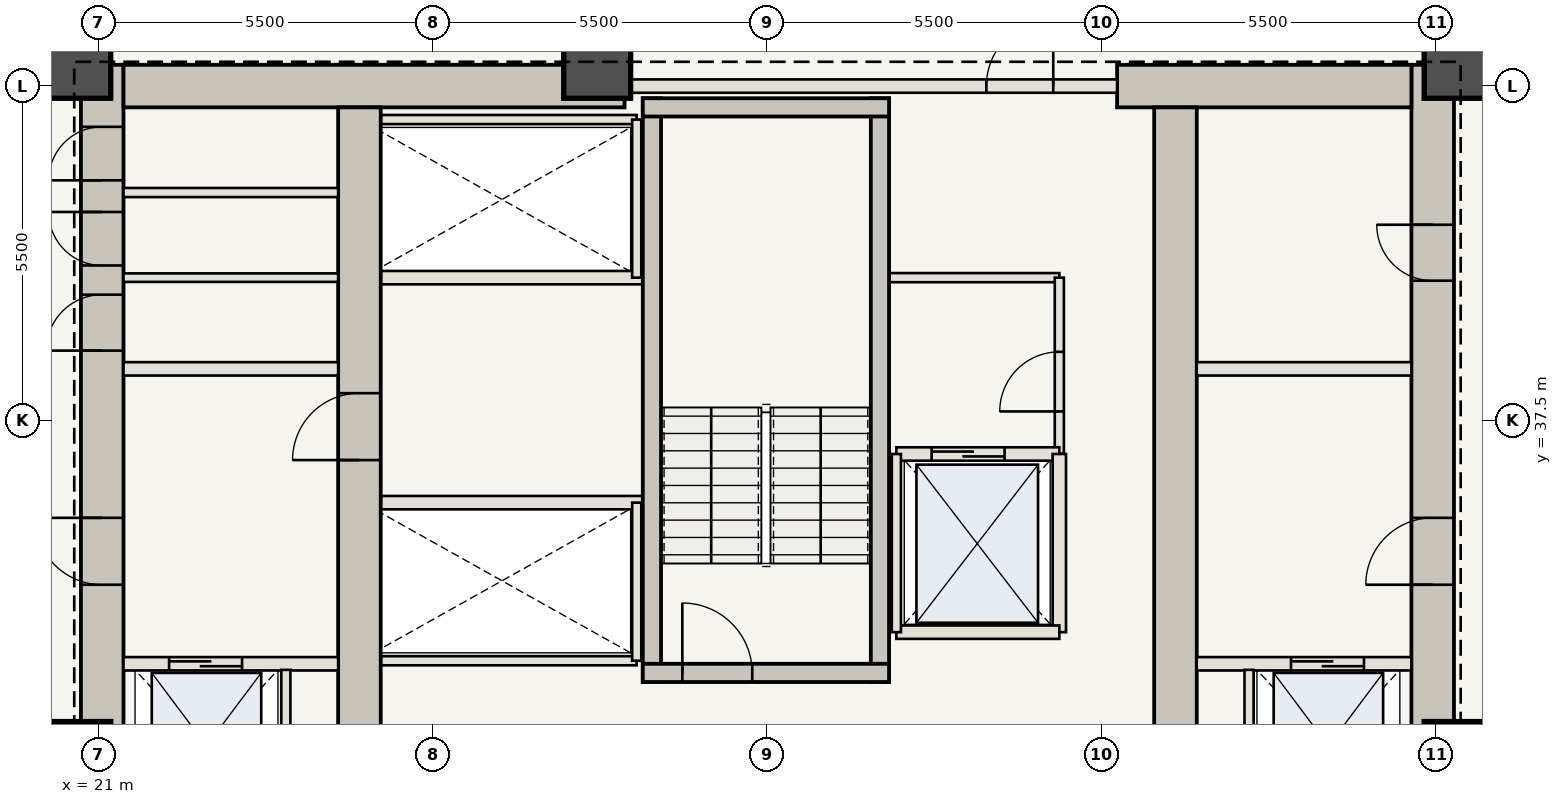
"""IFC4 building model, lengths in metres.
Left out: names, types, materials, properties, quantities, classifications, styles, units other than length and angle.
Written with IfcOpenShell. Run it as: python <this file> out.ifc"""

import sys

from ifc_helpers import new_model, si_unit, direction, frame, frame_2d, origin, origin_2d, place, context, subcontext, project, spatial, rectangle, extrude, element, fill, save


model = new_model("IFC4")
c1 = context("Model", 3, precision=1e-05, world=origin(), true_north=direction((0.0, 1.0)))
c2 = subcontext(c1, "Body", "Model", "MODEL_VIEW")
j1 = project(units=[si_unit("LENGTHUNIT", "METRE"), si_unit("PLANEANGLEUNIT", "RADIAN")], contexts=[c1])
p1 = place(None, origin())
s1 = spatial("IfcSite", under=j1, at=p1, CompositionType="ELEMENT")
p2 = place(p1, origin())
s2 = spatial("IfcBuilding", under=s1, at=p2, CompositionType="ELEMENT")
p3 = place(p2, frame((0.0, 0.0, 89.25)))
s3 = spatial("IfcBuildingStorey", under=s2, at=p3, CompositionType="ELEMENT", Elevation=89.25)
p4 = place(p3, frame((21.06, 30.6, 0.0), z_axis=(0.0, 0.0, 1.0), x_axis=(0.0, 1.0, 0.0)))
e1 = element("IfcWall", 1, at=p4, inside=s3, PredefinedType="SHEAR", context=c2, shape_type="SweptSolid", body=[
    extrude(rectangle(XDim=12.75, YDim=0.7, at=frame_2d((6.375, 0.0))), origin(), (0.0, 0.0, 1.0), 3.5),
])
p5 = place(p4, frame((4.2, 0.0, 0.0)))
e2 = element("IfcOpeningElement", 2, at=p5, cuts=e1, PredefinedType="OPENING", context=c2, shape_type="SweptSolid", body=[
    extrude(rectangle(XDim=1.1, YDim=2.15, at=frame_2d((0.55, 1.075))), frame((0.0, 0.36, 0.0), z_axis=(0.0, -1.0, 0.0), x_axis=(1.0, 0.0, 0.0)), (0.0, 0.0, 1.0), 0.72),
])
p6 = place(p4, frame((8.05, 0.0, 0.0)))
e3 = element("IfcOpeningElement", 3, at=p6, cuts=e1, PredefinedType="OPENING", context=c2, shape_type="SweptSolid", body=[
    extrude(rectangle(XDim=0.92, YDim=2.1, at=frame_2d((0.46, 1.05))), frame((0.0, 0.36, 0.0), z_axis=(0.0, -1.0, 0.0), x_axis=(1.0, 0.0, 0.0)), (0.0, 0.0, 1.0), 0.72),
])
p7 = place(p4, frame((9.45, 0.0, 0.0)))
e4 = element("IfcOpeningElement", 4, at=p7, cuts=e1, PredefinedType="OPENING", context=c2, shape_type="SweptSolid", body=[
    extrude(rectangle(XDim=0.88, YDim=2.1, at=frame_2d((0.44, 1.05))), frame((0.0, 0.36, 0.0), z_axis=(0.0, -1.0, 0.0), x_axis=(1.0, 0.0, 0.0)), (0.0, 0.0, 1.0), 0.72),
])
p8 = place(p4, frame((10.85, 0.0, 0.0)))
e5 = element("IfcOpeningElement", 5, at=p8, cuts=e1, PredefinedType="OPENING", context=c2, shape_type="SweptSolid", body=[
    extrude(rectangle(XDim=0.88, YDim=2.1, at=frame_2d((0.44, 1.05))), frame((0.0, 0.36, 0.0), z_axis=(0.0, -1.0, 0.0), x_axis=(1.0, 0.0, 0.0)), (0.0, 0.0, 1.0), 0.72),
])
p9 = place(p3, frame((42.94, 30.6, 0.0), z_axis=(0.0, 0.0, 1.0), x_axis=(0.0, 1.0, 0.0)))
e6 = element("IfcWall", 6, at=p9, inside=s3, PredefinedType="SHEAR", context=c2, shape_type="SweptSolid", body=[
    extrude(rectangle(XDim=12.75, YDim=0.7, at=frame_2d((6.375, 0.0))), origin(), (0.0, 0.0, 1.0), 3.5),
])
p10 = place(p9, frame((4.2, 0.0, 0.0)))
e7 = element("IfcOpeningElement", 7, at=p10, cuts=e6, PredefinedType="OPENING", context=c2, shape_type="SweptSolid", body=[
    extrude(rectangle(XDim=1.1, YDim=2.15, at=frame_2d((0.55, 1.075))), frame((0.0, 0.36, 0.0), z_axis=(0.0, -1.0, 0.0), x_axis=(1.0, 0.0, 0.0)), (0.0, 0.0, 1.0), 0.72),
])
p11 = place(p9, frame((9.2, 0.0, 0.0)))
e8 = element("IfcOpeningElement", 8, at=p11, cuts=e6, PredefinedType="OPENING", context=c2, shape_type="SweptSolid", body=[
    extrude(rectangle(XDim=0.92, YDim=2.1, at=frame_2d((0.46, 1.05))), frame((0.0, 0.36, 0.0), z_axis=(0.0, -1.0, 0.0), x_axis=(1.0, 0.0, 0.0)), (0.0, 0.0, 1.0), 0.72),
])
p12 = place(p3, frame((21.41, 43.0, 0.0), z_axis=(0.0, 0.0, 1.0), x_axis=(1.0, 0.0, 0.0)))
e9 = element("IfcWall", 9, at=p12, inside=s3, PredefinedType="SHEAR", context=c2, shape_type="SweptSolid", body=[
    extrude(rectangle(XDim=8.24, YDim=0.7, at=frame_2d((4.12, 0.0))), origin(), (0.0, 0.0, 1.0), 3.5),
])
p13 = place(p3, frame((37.75, 43.0, 0.0), z_axis=(0.0, 0.0, 1.0), x_axis=(1.0, 0.0, 0.0)))
e10 = element("IfcWall", 10, at=p13, inside=s3, PredefinedType="SHEAR", context=c2, shape_type="SweptSolid", body=[
    extrude(rectangle(XDim=4.84, YDim=0.7, at=frame_2d((2.42, 0.0))), origin(), (0.0, 0.0, 1.0), 3.5),
])
p14 = place(p3, frame((25.29, 30.6, 0.0), z_axis=(0.0, 0.0, 1.0), x_axis=(0.0, 1.0, 0.0)))
e11 = element("IfcWall", 11, at=p14, inside=s3, PredefinedType="SHEAR", context=c2, shape_type="SweptSolid", body=[
    extrude(rectangle(XDim=12.05, YDim=0.7, at=frame_2d((6.025, 0.0))), origin(), (0.0, 0.0, 1.0), 3.5),
])
p15 = place(p14, frame((6.25, 0.0, 0.0)))
e12 = element("IfcOpeningElement", 12, at=p15, cuts=e11, PredefinedType="OPENING", context=c2, shape_type="SweptSolid", body=[
    extrude(rectangle(XDim=1.1, YDim=2.15, at=frame_2d((0.55, 1.075))), frame((0.0, 0.36, 0.0), z_axis=(0.0, -1.0, 0.0), x_axis=(1.0, 0.0, 0.0)), (0.0, 0.0, 1.0), 0.72),
])
p16 = place(p3, frame((38.71, 30.6, 0.0), z_axis=(0.0, 0.0, 1.0), x_axis=(0.0, 1.0, 0.0)))
e13 = element("IfcWall", 13, at=p16, inside=s3, PredefinedType="SHEAR", context=c2, shape_type="SweptSolid", body=[
    extrude(rectangle(XDim=12.05, YDim=0.7, at=frame_2d((6.025, 0.0))), origin(), (0.0, 0.0, 1.0), 3.5),
])
for number, where, z_axis, x_axis in (
    (14, (43.35, 32.0, 0.0), (0.0, 0.0, 1.0), (1.0, 0.0, 0.0)),
    (15, (43.35, 43.35, 0.0), (0.0, 0.0, 1.0), (1.0, 0.0, 0.0)),
    (16, (29.2, 43.35, 0.0), (0.0, 0.0, 1.0), (1.0, 0.0, 0.0)),
    (17, (20.65, 43.35, 0.0), (0.0, 0.0, 1.0), (1.0, 0.0, 0.0)),
    (18, (20.65, 32.0, 0.0), (0.0, 0.0, 1.0), (1.0, 0.0, 0.0)),
):
    element("IfcColumn", number, at=place(p3, frame(where, z_axis=z_axis, x_axis=x_axis)), inside=s3, PredefinedType="COLUMN", context=c2, shape_type="SweptSolid", body=[
        extrude(rectangle(XDim=1.1, YDim=1.1, at=origin_2d()), origin(), (0.0, 0.0, 1.0), 3.5),
    ])
p17 = place(p3, frame((21.41, 33.5, 0.0), z_axis=(0.0, 0.0, 1.0), x_axis=(1.0, 0.0, 0.0)))
e19 = element("IfcWall", 19, at=p17, inside=s3, PredefinedType="STANDARD", context=c2, shape_type="SweptSolid", body=[
    extrude(rectangle(XDim=3.53, YDim=0.22, at=frame_2d((1.765, 0.0))), origin(), (0.0, 0.0, 1.0), 3.32),
])
p18 = place(p17, frame((0.75, 0.0, 0.0)))
e20 = element("IfcOpeningElement", 20, at=p18, cuts=e19, PredefinedType="OPENING", context=c2, shape_type="SweptSolid", body=[
    extrude(rectangle(XDim=1.2, YDim=2.2, at=frame_2d((0.6, 1.1))), frame((0.0, 0.12, 0.0), z_axis=(0.0, -1.0, 0.0), x_axis=(1.0, 0.0, 0.0)), (0.0, 0.0, 1.0), 0.24),
])
p19 = place(p3, frame((24.08, 30.75, 0.0), z_axis=(0.0, 0.0, 1.0), x_axis=(0.0, 1.0, 0.0)))
e21 = element("IfcWall", 21, at=p19, inside=s3, PredefinedType="STANDARD", context=c2, shape_type="SweptSolid", body=[
    extrude(rectangle(XDim=2.65, YDim=0.15, at=frame_2d((1.325, 0.0))), origin(), (0.0, 0.0, 1.0), 3.32),
])
p20 = place(p3, frame((39.06, 33.5, 0.0), z_axis=(0.0, 0.0, 1.0), x_axis=(1.0, 0.0, 0.0)))
e22 = element("IfcWall", 22, at=p20, inside=s3, PredefinedType="STANDARD", context=c2, shape_type="SweptSolid", body=[
    extrude(rectangle(XDim=3.53, YDim=0.22, at=frame_2d((1.765, 0.0))), origin(), (0.0, 0.0, 1.0), 3.32),
])
p21 = place(p20, frame((1.55, 0.0, 0.0)))
e23 = element("IfcOpeningElement", 23, at=p21, cuts=e22, PredefinedType="OPENING", context=c2, shape_type="SweptSolid", body=[
    extrude(rectangle(XDim=1.2, YDim=2.2, at=frame_2d((0.6, 1.1))), frame((0.0, 0.12, 0.0), z_axis=(0.0, -1.0, 0.0), x_axis=(1.0, 0.0, 0.0)), (0.0, 0.0, 1.0), 0.24),
])
p22 = place(p3, frame((39.92, 30.75, 0.0), z_axis=(0.0, 0.0, 1.0), x_axis=(0.0, 1.0, 0.0)))
e24 = element("IfcWall", 24, at=p22, inside=s3, PredefinedType="STANDARD", context=c2, shape_type="SweptSolid", body=[
    extrude(rectangle(XDim=2.65, YDim=0.15, at=frame_2d((1.325, 0.0))), origin(), (0.0, 0.0, 1.0), 3.32),
])
for number, where, z_axis, x_axis in (
    (25, (21.41, 38.35, 0.0), (0.0, 0.0, 1.0), (1.0, 0.0, 0.0)),
    (26, (39.06, 38.35, 0.0), (0.0, 0.0, 1.0), (1.0, 0.0, 0.0)),
):
    element("IfcWall", number, at=place(p3, frame(where, z_axis=z_axis, x_axis=x_axis)), inside=s3, PredefinedType="STANDARD", context=c2, shape_type="SweptSolid", body=[
        extrude(rectangle(XDim=3.53, YDim=0.22, at=frame_2d((1.765, 0.0))), origin(), (0.0, 0.0, 1.0), 3.32),
    ])
p23 = place(p3, frame((21.41, 39.85, 0.0), z_axis=(0.0, 0.0, 1.0), x_axis=(1.0, 0.0, 0.0)))
e27 = element("IfcWall", 27, at=p23, inside=s3, PredefinedType="STANDARD", context=c2, shape_type="SweptSolid", body=[
    extrude(rectangle(XDim=3.53, YDim=0.14, at=frame_2d((1.765, 0.0))), origin(), (0.0, 0.0, 1.0), 3.32),
])
p24 = place(p3, frame((21.41, 41.25, 0.0), z_axis=(0.0, 0.0, 1.0), x_axis=(1.0, 0.0, 0.0)))
e28 = element("IfcWall", 28, at=p24, inside=s3, PredefinedType="STANDARD", context=c2, shape_type="SweptSolid", body=[
    extrude(rectangle(XDim=3.53, YDim=0.15, at=frame_2d((1.765, 0.0))), origin(), (0.0, 0.0, 1.0), 3.32),
])
p25 = place(p3, frame((34.0, 39.85, 0.0), z_axis=(0.0, 0.0, 1.0), x_axis=(1.0, 0.0, 0.0)))
e29 = element("IfcWall", 29, at=p25, inside=s3, PredefinedType="STANDARD", context=c2, shape_type="SweptSolid", body=[
    extrude(rectangle(XDim=2.8, YDim=0.15, at=frame_2d((1.4, 0.0))), origin(), (0.0, 0.0, 1.0), 3.32),
])
p26 = place(p3, frame((36.8, 36.95, 0.0), z_axis=(0.0, 0.0, 1.0), x_axis=(0.0, 1.0, 0.0)))
e30 = element("IfcWall", 30, at=p26, inside=s3, PredefinedType="STANDARD", context=c2, shape_type="SweptSolid", body=[
    extrude(rectangle(XDim=2.9, YDim=0.15, at=frame_2d((1.45, 0.0))), origin(), (0.0, 0.0, 1.0), 3.32),
])
p27 = place(p26, frame((0.7, 0.0, 0.0)))
e31 = element("IfcOpeningElement", 31, at=p27, cuts=e30, PredefinedType="OPENING", context=c2, shape_type="SweptSolid", body=[
    extrude(rectangle(XDim=0.98, YDim=2.2, at=frame_2d((0.49, 1.1))), frame((0.0, 0.085, 0.0), z_axis=(0.0, -1.0, 0.0), x_axis=(1.0, 0.0, 0.0)), (0.0, 0.0, 1.0), 0.17),
])
p28 = place(p3, frame((25.65, 36.15, 0.0), z_axis=(0.0, 0.0, 1.0), x_axis=(1.0, 0.0, 0.0)))
e32 = element("IfcWall", 32, at=p28, inside=s3, PredefinedType="STANDARD", context=c2, shape_type="SweptSolid", body=[
    extrude(rectangle(XDim=4.3, YDim=0.22, at=frame_2d((2.15, 0.0))), origin(), (0.0, 0.0, 1.0), 3.32),
])
p29 = place(p3, frame((25.65, 33.55, 0.0), z_axis=(0.0, 0.0, 1.0), x_axis=(1.0, 0.0, 0.0)))
e33 = element("IfcWall", 33, at=p29, inside=s3, PredefinedType="STANDARD", context=c2, shape_type="SweptSolid", body=[
    extrude(rectangle(XDim=4.2, YDim=0.15, at=frame_2d((2.1, 0.0))), origin(), (0.0, 0.0, 1.0), 3.32),
])
p30 = place(p3, frame((29.85, 33.55, 0.0), z_axis=(0.0, 0.0, 1.0), x_axis=(0.0, 1.0, 0.0)))
e34 = element("IfcWall", 34, at=p30, inside=s3, PredefinedType="STANDARD", context=c2, shape_type="SweptSolid", body=[
    extrude(rectangle(XDim=2.6, YDim=0.15, at=frame_2d((1.3, 0.0))), origin(), (0.0, 0.0, 1.0), 3.32),
])
p31 = place(p3, frame((25.65, 39.85, 0.0), z_axis=(0.0, 0.0, 1.0), x_axis=(1.0, 0.0, 0.0)))
e35 = element("IfcWall", 35, at=p31, inside=s3, PredefinedType="STANDARD", context=c2, shape_type="SweptSolid", body=[
    extrude(rectangle(XDim=4.3, YDim=0.22, at=frame_2d((2.15, 0.0))), origin(), (0.0, 0.0, 1.0), 3.32),
])
p32 = place(p3, frame((25.65, 42.45, 0.0), z_axis=(0.0, 0.0, 1.0), x_axis=(1.0, 0.0, 0.0)))
e36 = element("IfcWall", 36, at=p32, inside=s3, PredefinedType="STANDARD", context=c2, shape_type="SweptSolid", body=[
    extrude(rectangle(XDim=4.2, YDim=0.15, at=frame_2d((2.1, 0.0))), origin(), (0.0, 0.0, 1.0), 3.32),
])
p33 = place(p3, frame((29.85, 39.85, 0.0), z_axis=(0.0, 0.0, 1.0), x_axis=(0.0, 1.0, 0.0)))
e37 = element("IfcWall", 37, at=p33, inside=s3, PredefinedType="STANDARD", context=c2, shape_type="SweptSolid", body=[
    extrude(rectangle(XDim=2.6, YDim=0.15, at=frame_2d((1.3, 0.0))), origin(), (0.0, 0.0, 1.0), 3.32),
])
for number, where, z_axis, x_axis in (
    (38, (30.1, 33.2, 0.0), (0.0, 0.0, 1.0), (0.0, 1.0, 0.0)),
    (39, (33.85, 33.2, 0.0), (0.0, 0.0, 1.0), (0.0, 1.0, 0.0)),
):
    element("IfcWall", number, at=place(p3, frame(where, z_axis=z_axis, x_axis=x_axis)), inside=s3, PredefinedType="SHEAR", context=c2, shape_type="SweptSolid", body=[
        extrude(rectangle(XDim=9.6, YDim=0.3, at=frame_2d((4.8, 0.0))), origin(), (0.0, 0.0, 1.0), 3.32),
    ])
p34 = place(p3, frame((29.95, 33.35, 0.0), z_axis=(0.0, 0.0, 1.0), x_axis=(1.0, 0.0, 0.0)))
e40 = element("IfcWall", 40, at=p34, inside=s3, PredefinedType="SHEAR", context=c2, shape_type="SweptSolid", body=[
    extrude(rectangle(XDim=4.05, YDim=0.3, at=frame_2d((2.025, 0.0))), origin(), (0.0, 0.0, 1.0), 3.32),
])
p35 = place(p34, frame((0.65, 0.0, 0.0)))
e41 = element("IfcOpeningElement", 41, at=p35, cuts=e40, PredefinedType="OPENING", context=c2, shape_type="SweptSolid", body=[
    extrude(rectangle(XDim=1.15, YDim=2.15, at=frame_2d((0.575, 1.075))), frame((0.0, 0.16, 0.0), z_axis=(0.0, -1.0, 0.0), x_axis=(1.0, 0.0, 0.0)), (0.0, 0.0, 1.0), 0.32),
])
p36 = place(p3, frame((29.95, 42.65, 0.0), z_axis=(0.0, 0.0, 1.0), x_axis=(1.0, 0.0, 0.0)))
e42 = element("IfcWall", 42, at=p36, inside=s3, PredefinedType="SHEAR", context=c2, shape_type="SweptSolid", body=[
    extrude(rectangle(XDim=4.05, YDim=0.3, at=frame_2d((2.025, 0.0))), origin(), (0.0, 0.0, 1.0), 3.32),
])
p37 = place(p3, frame((29.65, 43.0, 0.0), z_axis=(0.0, 0.0, 1.0), x_axis=(1.0, 0.0, 0.0)))
e43 = element("IfcWall", 43, at=p37, inside=s3, PredefinedType="STANDARD", context=c2, shape_type="SweptSolid", body=[
    extrude(rectangle(XDim=8.1, YDim=0.22, at=frame_2d((4.05, 0.0))), origin(), (0.0, 0.0, 1.0), 3.32),
])
p38 = place(p37, frame((5.95, 0.0, 0.0)))
e44 = element("IfcOpeningElement", 44, at=p38, cuts=e43, PredefinedType="OPENING", context=c2, shape_type="SweptSolid", body=[
    extrude(rectangle(XDim=1.1, YDim=2.15, at=frame_2d((0.55, 1.075))), frame((0.0, 0.12, 0.0), z_axis=(0.0, -1.0, 0.0), x_axis=(1.0, 0.0, 0.0)), (0.0, 0.0, 1.0), 0.24),
])
p39 = place(p3, frame((34.12, 36.95, 0.0), z_axis=(0.0, 0.0, 1.0), x_axis=(1.0, 0.0, 0.0)))
e45 = element("IfcWall", 45, at=p39, inside=s3, PredefinedType="STANDARD", context=c2, shape_type="SweptSolid", body=[
    extrude(rectangle(XDim=2.68, YDim=0.22, at=frame_2d((1.34, 0.0))), origin(), (0.0, 0.0, 1.0), 3.32),
])
p40 = place(p39, frame((0.58, 0.0, 0.0)))
e46 = element("IfcOpeningElement", 46, at=p40, cuts=e45, PredefinedType="OPENING", context=c2, shape_type="SweptSolid", body=[
    extrude(rectangle(XDim=1.2, YDim=2.2, at=frame_2d((0.6, 1.1))), frame((0.0, 0.12, 0.0), z_axis=(0.0, -1.0, 0.0), x_axis=(1.0, 0.0, 0.0)), (0.0, 0.0, 1.0), 0.24),
])
p41 = place(p3, frame((36.8, 34.02, 0.0), z_axis=(0.0, 0.0, 1.0), x_axis=(0.0, 1.0, 0.0)))
e47 = element("IfcWall", 47, at=p41, inside=s3, PredefinedType="STANDARD", context=c2, shape_type="SweptSolid", body=[
    extrude(rectangle(XDim=2.93, YDim=0.22, at=frame_2d((1.465, 0.0))), origin(), (0.0, 0.0, 1.0), 3.32),
])
p42 = place(p3, frame((34.12, 34.02, 0.0), z_axis=(0.0, 0.0, 1.0), x_axis=(1.0, 0.0, 0.0)))
e48 = element("IfcWall", 48, at=p42, inside=s3, PredefinedType="STANDARD", context=c2, shape_type="SweptSolid", body=[
    extrude(rectangle(XDim=2.68, YDim=0.22, at=frame_2d((1.34, 0.0))), origin(), (0.0, 0.0, 1.0), 3.32),
])
p43 = place(p3, frame((34.12, 34.02, 0.0), z_axis=(0.0, 0.0, 1.0), x_axis=(0.0, 1.0, 0.0)))
e49 = element("IfcWall", 49, at=p43, inside=s3, PredefinedType="STANDARD", context=c2, shape_type="SweptSolid", body=[
    extrude(rectangle(XDim=2.93, YDim=0.15, at=frame_2d((1.465, 0.0))), origin(), (0.0, 0.0, 1.0), 3.32),
])
p44 = place(p5, origin())
e50 = element("IfcDoor", 50, at=p44, inside=s3, OperationType="SINGLE_SWING_RIGHT", PredefinedType="DOOR", context=c2, shape_type="SweptSolid", body=[
    extrude(rectangle(XDim=1.1, YDim=2.15, at=frame_2d((0.55, 1.075))), frame((0.0, 0.025, 0.0), z_axis=(0.0, -1.0, 0.0), x_axis=(1.0, 0.0, 0.0)), (0.0, 0.0, 1.0), 0.05),
])
fill(e2, e50)
p45 = place(p10, origin())
e51 = element("IfcDoor", 51, at=p45, inside=s3, OperationType="SINGLE_SWING_LEFT", PredefinedType="DOOR", context=c2, shape_type="SweptSolid", body=[
    extrude(rectangle(XDim=1.1, YDim=2.15, at=frame_2d((0.55, 1.075))), frame((0.0, 0.025, 0.0), z_axis=(0.0, -1.0, 0.0), x_axis=(1.0, 0.0, 0.0)), (0.0, 0.0, 1.0), 0.05),
])
fill(e7, e51)
p46 = place(p15, origin())
e52 = element("IfcDoor", 52, at=p46, inside=s3, OperationType="SINGLE_SWING_LEFT", PredefinedType="DOOR", context=c2, shape_type="SweptSolid", body=[
    extrude(rectangle(XDim=1.1, YDim=2.15, at=frame_2d((0.55, 1.075))), frame((0.0, 0.025, 0.0), z_axis=(0.0, -1.0, 0.0), x_axis=(1.0, 0.0, 0.0)), (0.0, 0.0, 1.0), 0.05),
])
fill(e12, e52)
p47 = place(p6, origin())
e53 = element("IfcDoor", 53, at=p47, inside=s3, OperationType="SINGLE_SWING_LEFT", PredefinedType="DOOR", context=c2, shape_type="SweptSolid", body=[
    extrude(rectangle(XDim=0.92, YDim=2.1, at=frame_2d((0.46, 1.05))), frame((0.0, 0.025, 0.0), z_axis=(0.0, -1.0, 0.0), x_axis=(1.0, 0.0, 0.0)), (0.0, 0.0, 1.0), 0.05),
])
fill(e3, e53)
p48 = place(p7, origin())
e54 = element("IfcDoor", 54, at=p48, inside=s3, OperationType="SINGLE_SWING_RIGHT", PredefinedType="DOOR", context=c2, shape_type="SweptSolid", body=[
    extrude(rectangle(XDim=0.88, YDim=2.1, at=frame_2d((0.44, 1.05))), frame((0.0, 0.025, 0.0), z_axis=(0.0, -1.0, 0.0), x_axis=(1.0, 0.0, 0.0)), (0.0, 0.0, 1.0), 0.05),
])
fill(e4, e54)
p49 = place(p8, origin())
e55 = element("IfcDoor", 55, at=p49, inside=s3, OperationType="SINGLE_SWING_LEFT", PredefinedType="DOOR", context=c2, shape_type="SweptSolid", body=[
    extrude(rectangle(XDim=0.88, YDim=2.1, at=frame_2d((0.44, 1.05))), frame((0.0, 0.025, 0.0), z_axis=(0.0, -1.0, 0.0), x_axis=(1.0, 0.0, 0.0)), (0.0, 0.0, 1.0), 0.05),
])
fill(e5, e55)
p50 = place(p11, origin())
e56 = element("IfcDoor", 56, at=p50, inside=s3, OperationType="SINGLE_SWING_RIGHT", PredefinedType="DOOR", context=c2, shape_type="SweptSolid", body=[
    extrude(rectangle(XDim=0.92, YDim=2.1, at=frame_2d((0.46, 1.05))), frame((0.0, 0.025, 0.0), z_axis=(0.0, -1.0, 0.0), x_axis=(1.0, 0.0, 0.0)), (0.0, 0.0, 1.0), 0.05),
])
fill(e8, e56)
p51 = place(p18, origin())
e57 = element("IfcDoor", 57, at=p51, inside=s3, OperationType="DOUBLE_DOOR_SLIDING", PredefinedType="DOOR", context=c2, shape_type="SweptSolid", body=[
    extrude(rectangle(XDim=1.2, YDim=2.2, at=frame_2d((0.6, 1.1))), frame((0.0, 0.025, 0.0), z_axis=(0.0, -1.0, 0.0), x_axis=(1.0, 0.0, 0.0)), (0.0, 0.0, 1.0), 0.05),
])
fill(e20, e57)
p52 = place(p21, origin())
e58 = element("IfcDoor", 58, at=p52, inside=s3, OperationType="DOUBLE_DOOR_SLIDING", PredefinedType="DOOR", context=c2, shape_type="SweptSolid", body=[
    extrude(rectangle(XDim=1.2, YDim=2.2, at=frame_2d((0.6, 1.1))), frame((0.0, 0.025, 0.0), z_axis=(0.0, -1.0, 0.0), x_axis=(1.0, 0.0, 0.0)), (0.0, 0.0, 1.0), 0.05),
])
fill(e23, e58)
p53 = place(p27, origin())
e59 = element("IfcDoor", 59, at=p53, inside=s3, OperationType="SINGLE_SWING_LEFT", PredefinedType="DOOR", context=c2, shape_type="SweptSolid", body=[
    extrude(rectangle(XDim=0.98, YDim=2.2, at=frame_2d((0.49, 1.1))), frame((0.0, 0.025, 0.0), z_axis=(0.0, -1.0, 0.0), x_axis=(1.0, 0.0, 0.0)), (0.0, 0.0, 1.0), 0.05),
])
fill(e31, e59)
p54 = place(p35, origin())
e60 = element("IfcDoor", 60, at=p54, inside=s3, OperationType="SINGLE_SWING_LEFT", PredefinedType="DOOR", context=c2, shape_type="SweptSolid", body=[
    extrude(rectangle(XDim=1.15, YDim=2.15, at=frame_2d((0.575, 1.075))), frame((0.0, 0.025, 0.0), z_axis=(0.0, -1.0, 0.0), x_axis=(1.0, 0.0, 0.0)), (0.0, 0.0, 1.0), 0.05),
])
fill(e41, e60)
p55 = place(p38, origin())
e61 = element("IfcDoor", 61, at=p55, inside=s3, OperationType="SINGLE_SWING_RIGHT", PredefinedType="DOOR", context=c2, shape_type="SweptSolid", body=[
    extrude(rectangle(XDim=1.1, YDim=2.15, at=frame_2d((0.55, 1.075))), frame((0.0, 0.025, 0.0), z_axis=(0.0, -1.0, 0.0), x_axis=(1.0, 0.0, 0.0)), (0.0, 0.0, 1.0), 0.05),
])
fill(e44, e61)
p56 = place(p40, origin())
e62 = element("IfcDoor", 62, at=p56, inside=s3, OperationType="DOUBLE_DOOR_SLIDING", PredefinedType="DOOR", context=c2, shape_type="SweptSolid", body=[
    extrude(rectangle(XDim=1.2, YDim=2.2, at=frame_2d((0.6, 1.1))), frame((0.0, 0.025, 0.0), z_axis=(0.0, -1.0, 0.0), x_axis=(1.0, 0.0, 0.0)), (0.0, 0.0, 1.0), 0.05),
])
fill(e46, e62)
save(model, sys.argv[1])
